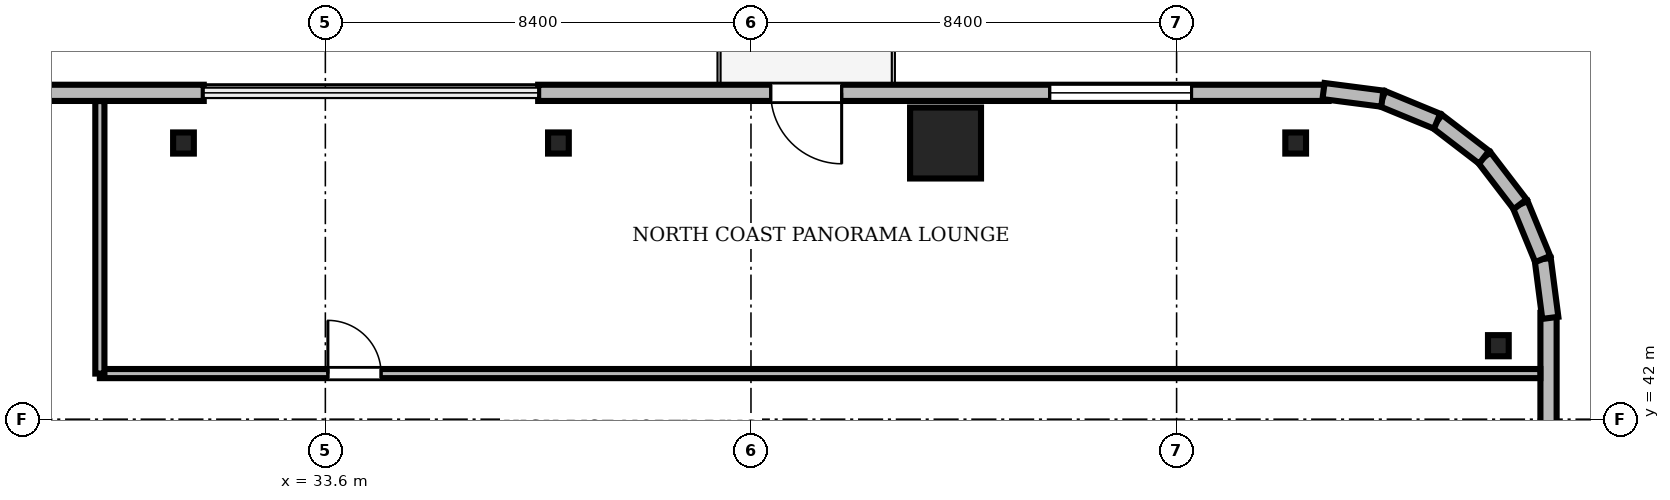
"""IFC4 building model, lengths in metres.
Left out: names, types, materials, properties, quantities, classifications, styles, units other than length and angle.
Written with IfcOpenShell. Run it as: python <this file> out.ifc"""

import sys

from ifc_helpers import new_model, si_unit, direction, frame, frame_2d, origin, origin_2d, place, context, subcontext, project, spatial, rectangle, i_section, extrude, source, transform, mapped, element, fill, save


model = new_model("IFC4")
c1 = context("Model", 3, precision=1e-05, world=origin(), true_north=direction((0.0, 1.0)))
c2 = subcontext(c1, "Body", "Model", "MODEL_VIEW")
j1 = project(units=[si_unit("LENGTHUNIT", "METRE"), si_unit("PLANEANGLEUNIT", "RADIAN")], contexts=[c1])
p1 = place(None, origin())
s1 = spatial("IfcSite", under=j1, at=p1, CompositionType="ELEMENT")
p2 = place(p1, origin())
s2 = spatial("IfcBuilding", under=s1, at=p2, CompositionType="ELEMENT")
p3 = place(p2, frame((0.0, 0.0, 211.05)))
s3 = spatial("IfcBuildingStorey", under=s2, at=p3, CompositionType="ELEMENT", Elevation=211.05)
m1 = source(origin(), c2, "Body", "SweptSolid", [
    extrude(rectangle(XDim=1.4, YDim=1.4, at=origin_2d()), origin(), (0.0, 0.0, 1.0), 3.53),
])
p4 = place(p3, frame((45.84, 47.45, 0.0), z_axis=(0.0, 0.0, 1.0), x_axis=(1.0, 0.0, 0.0)))
e1 = element("IfcColumn", 1, at=p4, inside=s3, PredefinedType="COLUMN", context=c2, shape_type="MappedRepresentation", body=[
    mapped(m1, transform((0.0, 0.0, 0.0), scale=1.0)),
])
m2 = source(origin(), c2, "Body", "SweptSolid", [
    extrude(i_section(OverallWidth=0.409, OverallDepth=0.417, WebThickness=0.021, FlangeThickness=0.033, FilletRadius=0.015, at=origin_2d()), origin(), (0.0, 0.0, 1.0), 3.53),
])
for number, where, z_axis, x_axis in (
    (2, (56.75, 43.45, 0.0), (0.0, 0.0, 1.0), (1.0, 0.0, 0.0)),
    (3, (52.75, 47.45, 0.0), (0.0, 0.0, 1.0), (1.0, 0.0, 0.0)),
    (4, (38.2, 47.45, 0.0), (0.0, 0.0, 1.0), (1.0, 0.0, 0.0)),
    (5, (30.8, 47.45, 0.0), (0.0, 0.0, 1.0), (1.0, 0.0, 0.0)),
):
    element("IfcColumn", number, at=place(p3, frame(where, z_axis=z_axis, x_axis=x_axis)), inside=s3, PredefinedType="COLUMN", context=c2, shape_type="MappedRepresentation", body=[
        mapped(m2, transform((0.0, 0.0, 0.0), scale=1.0)),
    ])
m3 = source(origin(), c2, "Body", "SweptSolid", [
    extrude(rectangle(XDim=15.6, YDim=0.32, at=frame_2d((7.8, 0.0))), origin(), (0.0, 0.0, 1.0), 3.53),
])
p5 = place(p3, frame((53.4, 48.44, 0.0), z_axis=(0.0, 0.0, 1.0), x_axis=(-1.0, 0.0, 0.0)))
e6 = element("IfcWall", 6, at=p5, inside=s3, PredefinedType="SOLIDWALL", context=c2, shape_type="MappedRepresentation", body=[
    mapped(m3, transform((0.0, 0.0, 0.0), scale=1.0)),
])
m4 = source(origin(), c2, "Body", "SweptSolid", [
    extrude(rectangle(XDim=1.4, YDim=2.3, at=frame_2d((0.7, 1.15))), frame((0.0, 0.17, 0.0), z_axis=(0.0, -1.0, 0.0), x_axis=(1.0, 0.0, 0.0)), (0.0, 0.0, 1.0), 0.34),
])
p6 = place(p5, frame((9.61, 0.0, 0.0)))
e7 = element("IfcOpeningElement", 7, at=p6, cuts=e6, PredefinedType="OPENING", context=c2, shape_type="MappedRepresentation", body=[
    mapped(m4, transform((0.0, 0.0, 0.0), scale=1.0)),
])
m5 = source(origin(), c2, "Body", "SweptSolid", [
    extrude(rectangle(XDim=2.8, YDim=2.4, at=frame_2d((1.4, 1.2))), frame((0.0, 0.17, 0.0), z_axis=(0.0, -1.0, 0.0), x_axis=(1.0, 0.0, 0.0)), (0.0, 0.0, 1.0), 0.34),
])
p7 = place(p5, frame((2.705, 0.0, 0.72)))
e8 = element("IfcOpeningElement", 8, at=p7, cuts=e6, PredefinedType="OPENING", context=c2, shape_type="MappedRepresentation", body=[
    mapped(m5, transform((0.0, 0.0, 0.0), scale=1.0)),
])
p8 = place(p3, frame((31.2, 48.44, 0.0), z_axis=(0.0, 0.0, 1.0), x_axis=(-1.0, 0.0, 0.0)))
e9 = element("IfcWall", 9, at=p8, inside=s3, PredefinedType="SOLIDWALL", context=c2, shape_type="MappedRepresentation", body=[
    mapped(m3, transform((0.0, 0.0, 0.0), scale=1.0)),
])
p9 = place(p8, frame((10.095, 0.0, 0.72)))
e10 = element("IfcOpeningElement", 10, at=p9, cuts=e9, PredefinedType="OPENING", context=c2, shape_type="MappedRepresentation", body=[
    mapped(m5, transform((0.0, 0.0, 0.0), scale=1.0)),
])
m6 = source(origin(), c2, "Body", "SweptSolid", [
    extrude(rectangle(XDim=15.6, YDim=0.32, at=frame_2d((7.8, 0.0))), origin(), (0.0, 0.0, 1.0), 3.53),
])
p10 = place(p3, frame((57.74, 28.5, 0.0), z_axis=(0.0, 0.0, 1.0), x_axis=(0.0, 1.0, 0.0)))
e11 = element("IfcWall", 11, at=p10, inside=s3, PredefinedType="SOLIDWALL", context=c2, shape_type="MappedRepresentation", body=[
    mapped(m6, transform((0.0, 0.0, 0.0), scale=1.0)),
])
p11 = place(p10, frame((10.095, 0.0, 0.72)))
e12 = element("IfcOpeningElement", 12, at=p11, cuts=e11, PredefinedType="OPENING", context=c2, shape_type="MappedRepresentation", body=[
    mapped(m5, transform((0.0, 0.0, 0.0), scale=1.0)),
])
m7 = source(origin(), c2, "Body", "SweptSolid", [
    extrude(rectangle(XDim=1.17, YDim=0.32, at=frame_2d((0.585, 0.0))), origin(), (0.0, 0.0, 1.0), 3.53),
])
p12 = place(p3, frame((57.776, 44.0, 0.0), z_axis=(0.0, 0.0, 1.0), x_axis=(-0.128295670475, 0.991735963317, 0.0)))
e13 = element("IfcWall", 13, at=p12, inside=s3, PredefinedType="SOLIDWALL", context=c2, shape_type="MappedRepresentation", body=[
    mapped(m7, transform((0.0, 0.0, 0.0), scale=1.0)),
])
m8 = source(origin(), c2, "Body", "SweptSolid", [
    extrude(rectangle(XDim=1.169, YDim=0.32, at=frame_2d((0.584, 0.0))), origin(), (0.0, 0.0, 1.0), 3.53),
])
p13 = place(p3, frame((57.625, 45.16, 0.0), z_axis=(0.0, 0.0, 1.0), x_axis=(-0.381054331552, 0.924552646638, 0.0)))
e14 = element("IfcWall", 14, at=p13, inside=s3, PredefinedType="SOLIDWALL", context=c2, shape_type="MappedRepresentation", body=[
    mapped(m8, transform((0.0, 0.0, 0.0), scale=1.0)),
])
m9 = source(origin(), c2, "Body", "SweptSolid", [
    extrude(rectangle(XDim=1.169, YDim=0.32, at=frame_2d((0.584, 0.0))), origin(), (0.0, 0.0, 1.0), 3.53),
])
p14 = place(p3, frame((57.18, 46.241, 0.0), z_axis=(0.0, 0.0, 1.0), x_axis=(-0.608387696831, 0.793639975269, 0.0)))
e15 = element("IfcWall", 15, at=p14, inside=s3, PredefinedType="SOLIDWALL", context=c2, shape_type="MappedRepresentation", body=[
    mapped(m9, transform((0.0, 0.0, 0.0), scale=1.0)),
])
m10 = source(origin(), c2, "Body", "SweptSolid", [
    extrude(rectangle(XDim=1.169, YDim=0.32, at=frame_2d((0.584, 0.0))), origin(), (0.0, 0.0, 1.0), 3.53),
])
p15 = place(p3, frame((56.469, 47.169, 0.0), z_axis=(0.0, 0.0, 1.0), x_axis=(-0.793663520347, 0.608356981114, 0.0)))
e16 = element("IfcWall", 16, at=p15, inside=s3, PredefinedType="SOLIDWALL", context=c2, shape_type="MappedRepresentation", body=[
    mapped(m10, transform((0.0, 0.0, 0.0), scale=1.0)),
])
p16 = place(p3, frame((55.541, 47.88, 0.0), z_axis=(0.0, 0.0, 1.0), x_axis=(-0.924552646638, 0.381054331552, 0.0)))
e17 = element("IfcWall", 17, at=p16, inside=s3, PredefinedType="SOLIDWALL", context=c2, shape_type="MappedRepresentation", body=[
    mapped(m8, transform((0.0, 0.0, 0.0), scale=1.0)),
])
p17 = place(p3, frame((54.46, 48.325, 0.0), z_axis=(0.0, 0.0, 1.0), x_axis=(-0.991735963317, 0.128295670475, 0.0)))
e18 = element("IfcWall", 18, at=p17, inside=s3, PredefinedType="SOLIDWALL", context=c2, shape_type="MappedRepresentation", body=[
    mapped(m7, transform((0.0, 0.0, 0.0), scale=1.0)),
])
m11 = source(origin(), c2, "Body", "SweptSolid", [
    extrude(rectangle(XDim=28.428, YDim=0.18, at=frame_2d((14.214, 0.0))), origin(), (0.0, 0.0, 1.0), 2.772),
])
p18 = place(p3, frame((29.15, 42.9, 0.0), z_axis=(0.0, 0.0, 1.0), x_axis=(1.0, 0.0, 0.0)))
e19 = element("IfcWall", 19, at=p18, inside=s3, PredefinedType="PARTITIONING", context=c2, shape_type="MappedRepresentation", body=[
    mapped(m11, transform((0.0, 0.0, 0.0), scale=1.0)),
])
m12 = source(origin(), c2, "Body", "SweptSolid", [
    extrude(rectangle(XDim=1.05, YDim=2.2, at=frame_2d((0.525, 1.1))), frame((0.0, 0.1, 0.0), z_axis=(0.0, -1.0, 0.0), x_axis=(1.0, 0.0, 0.0)), (0.0, 0.0, 1.0), 0.2),
])
p19 = place(p18, frame((4.5, 0.0, 0.0)))
e20 = element("IfcOpeningElement", 20, at=p19, cuts=e19, PredefinedType="OPENING", context=c2, shape_type="MappedRepresentation", body=[
    mapped(m12, transform((0.0, 0.0, 0.0), scale=1.0)),
])
m13 = source(origin(), c2, "Body", "SweptSolid", [
    extrude(rectangle(XDim=5.378, YDim=0.18, at=frame_2d((2.689, 0.0))), origin(), (0.0, 0.0, 1.0), 2.772),
])
p20 = place(p3, frame((29.15, 42.9, 0.0), z_axis=(0.0, 0.0, 1.0), x_axis=(0.0, 1.0, 0.0)))
e21 = element("IfcWall", 21, at=p20, inside=s3, PredefinedType="PARTITIONING", context=c2, shape_type="MappedRepresentation", body=[
    mapped(m13, transform((0.0, 0.0, 0.0), scale=1.0)),
])
m14 = source(origin(), c2, "Body", "SweptSolid", [
    extrude(rectangle(XDim=1.4, YDim=2.3, at=frame_2d((0.7, 1.15))), frame((0.0, 0.025, 0.0), z_axis=(0.0, -1.0, 0.0), x_axis=(1.0, 0.0, 0.0)), (0.0, 0.0, 1.0), 0.05),
])
p21 = place(p6, frame((1.4, 0.0, 0.0), z_axis=(0.0, 0.0, 1.0), x_axis=(-1.0, 0.0, 0.0)))
e22 = element("IfcDoor", 22, at=p21, inside=s3, OperationType="DOUBLE_DOOR_SLIDING", PredefinedType="DOOR", context=c2, shape_type="MappedRepresentation", body=[
    mapped(m14, transform((0.0, 0.0, 0.0), scale=1.0)),
])
fill(e7, e22)
m15 = source(origin(), c2, "Body", "SweptSolid", [
    extrude(rectangle(XDim=2.8, YDim=2.4, at=frame_2d((1.4, 1.2))), frame((0.0, 0.03, 0.0), z_axis=(0.0, -1.0, 0.0), x_axis=(1.0, 0.0, 0.0)), (0.0, 0.0, 1.0), 0.06),
])
p22 = place(p7, origin())
e23 = element("IfcWindow", 23, at=p22, inside=s3, PartitioningType="SINGLE_PANEL", PredefinedType="WINDOW", context=c2, shape_type="MappedRepresentation", body=[
    mapped(m15, transform((0.0, 0.0, 0.0), scale=1.0)),
])
fill(e8, e23)
m16 = source(origin(), c2, "Body", "SweptSolid", [
    extrude(rectangle(XDim=1.05, YDim=2.2, at=frame_2d((0.525, 1.1))), frame((0.0, 0.025, 0.0), z_axis=(0.0, -1.0, 0.0), x_axis=(1.0, 0.0, 0.0)), (0.0, 0.0, 1.0), 0.05),
])
p23 = place(p19, origin())
e24 = element("IfcDoor", 24, at=p23, inside=s3, OperationType="SINGLE_SWING_LEFT", PredefinedType="DOOR", context=c2, shape_type="MappedRepresentation", body=[
    mapped(m16, transform((0.0, 0.0, 0.0), scale=1.0)),
])
fill(e20, e24)
save(model, sys.argv[1])
